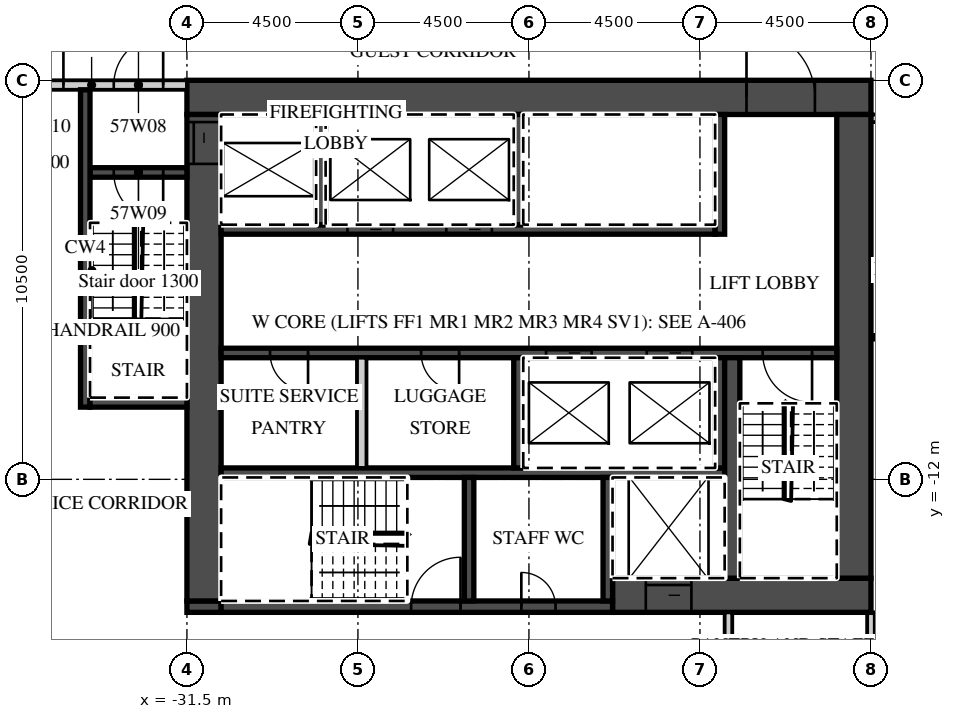
"""IFC4 building model, lengths in metres.
Left out: names, types, materials, properties, quantities, classifications, styles, units other than length and angle.
Written with IfcOpenShell. Run it as: python <this file> out.ifc"""

import sys

from ifc_helpers import new_model, si_unit, direction, frame, frame_2d, origin, place, context, subcontext, project, spatial, rectangle, extrude, element, fill, save


model = new_model("IFC4")
c1 = context("Model", 3, precision=1e-05, world=origin(), true_north=direction((0.0, 1.0)))
c2 = subcontext(c1, "Body", "Model", "MODEL_VIEW")
j1 = project(units=[si_unit("LENGTHUNIT", "METRE"), si_unit("PLANEANGLEUNIT", "RADIAN")], contexts=[c1])
p1 = place(None, origin())
s1 = spatial("IfcSite", under=j1, at=p1, CompositionType="ELEMENT")
p2 = place(p1, origin())
s2 = spatial("IfcBuilding", under=s1, at=p2, CompositionType="ELEMENT")
p3 = place(p2, frame((0.0, 0.0, 234.2)))
s3 = spatial("IfcBuildingStorey", under=s2, at=p3, CompositionType="ELEMENT", Elevation=234.2)
p4 = place(p3, frame((-13.5, -19.641, 0.0), z_axis=(0.0, 0.0, 1.0), x_axis=(0.0, 1.0, 0.0)))
e1 = element("IfcWall", 1, at=p4, inside=s3, PredefinedType="PARTITIONING", context=c2, shape_type="SweptSolid", body=[
    extrude(rectangle(XDim=4.141, YDim=0.2, at=frame_2d((2.071, 0.0))), origin(), (0.0, 0.0, 1.0), 3.02),
])
p5 = place(p3, frame((-13.5, -2.5, 0.0), z_axis=(0.0, 0.0, 1.0), x_axis=(1.0, 0.0, 0.0)))
e2 = element("IfcWall", 2, at=p5, inside=s3, PredefinedType="PARTITIONING", context=c2, shape_type="SweptSolid", body=[
    extrude(rectangle(XDim=27.0, YDim=0.2, at=frame_2d((13.5, 0.0))), origin(), (0.0, 0.0, 1.0), 3.02),
])
p6 = place(p5, frame((2.925, 0.0, 0.0)))
e3 = element("IfcOpeningElement", 3, at=p6, cuts=e2, PredefinedType="OPENING", context=c2, shape_type="SweptSolid", body=[
    extrude(rectangle(XDim=1.0, YDim=2.1, at=frame_2d((0.5, 1.05))), frame((0.0, 0.11, 0.0), z_axis=(0.0, -1.0, 0.0), x_axis=(1.0, 0.0, 0.0)), (0.0, 0.0, 1.0), 0.22),
])
p7 = place(p5, frame((9.863, 0.0, 0.0)))
e4 = element("IfcOpeningElement", 4, at=p7, cuts=e2, PredefinedType="OPENING", context=c2, shape_type="SweptSolid", body=[
    extrude(rectangle(XDim=1.2, YDim=2.1, at=frame_2d((0.6, 1.05))), frame((0.0, 0.11, 0.0), z_axis=(0.0, -1.0, 0.0), x_axis=(1.0, 0.0, 0.0)), (0.0, 0.0, 1.0), 0.22),
])
p8 = place(p5, frame((16.45, 0.0, 0.0)))
e5 = element("IfcOpeningElement", 5, at=p8, cuts=e2, PredefinedType="OPENING", context=c2, shape_type="SweptSolid", body=[
    extrude(rectangle(XDim=1.0, YDim=2.1, at=frame_2d((0.5, 1.05))), frame((0.0, 0.11, 0.0), z_axis=(0.0, -1.0, 0.0), x_axis=(1.0, 0.0, 0.0)), (0.0, 0.0, 1.0), 0.22),
])
p9 = place(p5, frame((20.925, 0.0, 0.0)))
e6 = element("IfcOpeningElement", 6, at=p9, cuts=e2, PredefinedType="OPENING", context=c2, shape_type="SweptSolid", body=[
    extrude(rectangle(XDim=1.0, YDim=2.1, at=frame_2d((0.5, 1.05))), frame((0.0, 0.11, 0.0), z_axis=(0.0, -1.0, 0.0), x_axis=(1.0, 0.0, 0.0)), (0.0, 0.0, 1.0), 0.22),
])
p10 = place(p5, frame((25.425, 0.0, 0.0)))
e7 = element("IfcOpeningElement", 7, at=p10, cuts=e2, PredefinedType="OPENING", context=c2, shape_type="SweptSolid", body=[
    extrude(rectangle(XDim=1.0, YDim=2.1, at=frame_2d((0.5, 1.05))), frame((0.0, 0.11, 0.0), z_axis=(0.0, -1.0, 0.0), x_axis=(1.0, 0.0, 0.0)), (0.0, 0.0, 1.0), 0.22),
])
p11 = place(p3, frame((-31.5, -1.95, 0.0), z_axis=(0.0, 0.0, 1.0), x_axis=(1.0, 0.0, 0.0)))
e8 = element("IfcWall", 8, at=p11, inside=s3, PredefinedType="SHEAR", context=c2, shape_type="SweptSolid", body=[
    extrude(rectangle(XDim=18.0, YDim=0.9, at=frame_2d((9.0, 0.0))), origin(), (0.0, 0.0, 1.0), 3.02),
])
p12 = place(p11, frame((14.725, 0.0, 0.0)))
e9 = element("IfcOpeningElement", 9, at=p12, cuts=e8, PredefinedType="OPENING", context=c2, shape_type="SweptSolid", body=[
    extrude(rectangle(XDim=1.8, YDim=2.1, at=frame_2d((0.9, 1.05))), frame((0.0, 0.46, 0.0), z_axis=(0.0, -1.0, 0.0), x_axis=(1.0, 0.0, 0.0)), (0.0, 0.0, 1.0), 0.92),
])
p13 = place(p3, frame((-20.3, -15.05, 0.0), z_axis=(0.0, 0.0, 1.0), x_axis=(1.0, 0.0, 0.0)))
e10 = element("IfcWall", 10, at=p13, inside=s3, PredefinedType="SHEAR", context=c2, shape_type="SweptSolid", body=[
    extrude(rectangle(XDim=6.8, YDim=0.9, at=frame_2d((3.4, 0.0))), origin(), (0.0, 0.0, 1.0), 3.02),
])
p14 = place(p13, frame((0.875, 0.0, 0.0)))
e11 = element("IfcOpeningElement", 11, at=p14, cuts=e10, PredefinedType="OPENING", context=c2, shape_type="SweptSolid", body=[
    extrude(rectangle(XDim=1.2, YDim=2.1, at=frame_2d((0.6, 1.05))), frame((0.0, 0.46, 0.0), z_axis=(0.0, -1.0, 0.0), x_axis=(1.0, 0.0, 0.0)), (0.0, 0.0, 1.0), 0.92),
])
p15 = place(p3, frame((-31.5, -15.35, 0.0), z_axis=(0.0, 0.0, 1.0), x_axis=(1.0, 0.0, 0.0)))
e12 = element("IfcWall", 12, at=p15, inside=s3, PredefinedType="SHEAR", context=c2, shape_type="SweptSolid", body=[
    extrude(rectangle(XDim=0.9, YDim=0.3, at=frame_2d((0.45, 0.0))), origin(), (0.0, 0.0, 1.0), 3.02),
])
p16 = place(p3, frame((-30.6, -15.35, 0.0), z_axis=(0.0, 0.0, 1.0), x_axis=(1.0, 0.0, 0.0)))
e13 = element("IfcWall", 13, at=p16, inside=s3, PredefinedType="SHEAR", context=c2, shape_type="SweptSolid", body=[
    extrude(rectangle(XDim=10.3, YDim=0.3, at=frame_2d((5.15, 0.0))), origin(), (0.0, 0.0, 1.0), 3.02),
])
p17 = place(p16, frame((5.0, 0.0, 0.0)))
e14 = element("IfcOpeningElement", 14, at=p17, cuts=e13, PredefinedType="OPENING", context=c2, shape_type="SweptSolid", body=[
    extrude(rectangle(XDim=1.3, YDim=2.1, at=frame_2d((0.65, 1.05))), frame((0.0, 0.16, 0.0), z_axis=(0.0, -1.0, 0.0), x_axis=(1.0, 0.0, 0.0)), (0.0, 0.0, 1.0), 0.32),
])
p18 = place(p16, frame((7.9, 0.0, 0.0)))
e15 = element("IfcOpeningElement", 15, at=p18, cuts=e13, PredefinedType="OPENING", context=c2, shape_type="SweptSolid", body=[
    extrude(rectangle(XDim=0.9, YDim=2.1, at=frame_2d((0.45, 1.05))), frame((0.0, 0.16, 0.0), z_axis=(0.0, -1.0, 0.0), x_axis=(1.0, 0.0, 0.0)), (0.0, 0.0, 1.0), 0.32),
])
p19 = place(p3, frame((-31.05, -15.2, 0.0), z_axis=(0.0, 0.0, 1.0), x_axis=(0.0, 1.0, 0.0)))
e16 = element("IfcWall", 16, at=p19, inside=s3, PredefinedType="SHEAR", context=c2, shape_type="SweptSolid", body=[
    extrude(rectangle(XDim=12.8, YDim=0.9, at=frame_2d((6.4, 0.0))), origin(), (0.0, 0.0, 1.0), 3.02),
])
p20 = place(p19, frame((11.5, 0.0, 0.0)))
e17 = element("IfcOpeningElement", 17, at=p20, cuts=e16, PredefinedType="OPENING", context=c2, shape_type="SweptSolid", body=[
    extrude(rectangle(XDim=1.1, YDim=2.1, at=frame_2d((0.55, 1.05))), frame((0.0, 0.46, 0.0), z_axis=(0.0, -1.0, 0.0), x_axis=(1.0, 0.0, 0.0)), (0.0, 0.0, 1.0), 0.92),
])
p21 = place(p3, frame((-13.95, -14.6, 0.0), z_axis=(0.0, 0.0, 1.0), x_axis=(0.0, 1.0, 0.0)))
e18 = element("IfcWall", 18, at=p21, inside=s3, PredefinedType="SHEAR", context=c2, shape_type="SweptSolid", body=[
    extrude(rectangle(XDim=12.2, YDim=0.9, at=frame_2d((6.1, 0.0))), origin(), (0.0, 0.0, 1.0), 3.02),
])
p22 = place(p3, frame((-30.6, -5.425, 0.0), z_axis=(0.0, 0.0, 1.0), x_axis=(1.0, 0.0, 0.0)))
e19 = element("IfcWall", 19, at=p22, inside=s3, PredefinedType="SHEAR", context=c2, shape_type="SweptSolid", body=[
    extrude(rectangle(XDim=13.0, YDim=0.25, at=frame_2d((6.5, 0.0))), origin(), (0.0, 0.0, 1.0), 3.02),
])
p23 = place(p22, frame((3.325, 0.0, 0.0)))
e20 = element("IfcOpeningElement", 20, at=p23, cuts=e19, PredefinedType="OPENING", context=c2, shape_type="SweptSolid", body=[
    extrude(rectangle(XDim=1.2, YDim=2.1, at=frame_2d((0.6, 1.05))), frame((0.0, 0.135, 0.0), z_axis=(0.0, -1.0, 0.0), x_axis=(1.0, 0.0, 0.0)), (0.0, 0.0, 1.0), 0.27),
])
p24 = place(p22, frame((5.925, 0.0, 0.0)))
e21 = element("IfcOpeningElement", 21, at=p24, cuts=e19, PredefinedType="OPENING", context=c2, shape_type="SweptSolid", body=[
    extrude(rectangle(XDim=1.2, YDim=2.1, at=frame_2d((0.6, 1.05))), frame((0.0, 0.135, 0.0), z_axis=(0.0, -1.0, 0.0), x_axis=(1.0, 0.0, 0.0)), (0.0, 0.0, 1.0), 0.27),
])
p25 = place(p3, frame((-17.475, -5.55, 0.0), z_axis=(0.0, 0.0, 1.0), x_axis=(0.0, 1.0, 0.0)))
e22 = element("IfcWall", 22, at=p25, inside=s3, PredefinedType="SHEAR", context=c2, shape_type="SweptSolid", body=[
    extrude(rectangle(XDim=3.15, YDim=0.25, at=frame_2d((1.575, 0.0))), origin(), (0.0, 0.0, 1.0), 3.02),
])
for number, where, z_axis, x_axis in (
    (23, (-27.975, -5.3, 0.0), (0.0, 0.0, 1.0), (0.0, 1.0, 0.0)),
    (24, (-22.775, -5.3, 0.0), (0.0, 0.0, 1.0), (0.0, 1.0, 0.0)),
):
    element("IfcWall", number, at=place(p3, frame(where, z_axis=z_axis, x_axis=x_axis)), inside=s3, PredefinedType="SHEAR", context=c2, shape_type="SweptSolid", body=[
        extrude(rectangle(XDim=2.9, YDim=0.25, at=frame_2d((1.45, 0.0))), origin(), (0.0, 0.0, 1.0), 3.02),
    ])
p26 = place(p3, frame((-30.6, -8.675, 0.0), z_axis=(0.0, 0.0, 1.0), x_axis=(1.0, 0.0, 0.0)))
e25 = element("IfcWall", 25, at=p26, inside=s3, PredefinedType="SHEAR", context=c2, shape_type="SweptSolid", body=[
    extrude(rectangle(XDim=16.2, YDim=0.25, at=frame_2d((8.1, 0.0))), origin(), (0.0, 0.0, 1.0), 3.02),
])
p27 = place(p26, frame((8.55, 0.0, 0.0)))
e26 = element("IfcOpeningElement", 26, at=p27, cuts=e25, PredefinedType="OPENING", context=c2, shape_type="SweptSolid", body=[
    extrude(rectangle(XDim=1.2, YDim=2.1, at=frame_2d((0.6, 1.05))), frame((0.0, 0.135, 0.0), z_axis=(0.0, -1.0, 0.0), x_axis=(1.0, 0.0, 0.0)), (0.0, 0.0, 1.0), 0.27),
])
p28 = place(p26, frame((11.2, 0.0, 0.0)))
e27 = element("IfcOpeningElement", 27, at=p28, cuts=e25, PredefinedType="OPENING", context=c2, shape_type="SweptSolid", body=[
    extrude(rectangle(XDim=1.2, YDim=2.1, at=frame_2d((0.6, 1.05))), frame((0.0, 0.135, 0.0), z_axis=(0.0, -1.0, 0.0), x_axis=(1.0, 0.0, 0.0)), (0.0, 0.0, 1.0), 0.27),
])
p29 = place(p26, frame((14.25, 0.0, 0.0)))
e28 = element("IfcOpeningElement", 28, at=p29, cuts=e25, PredefinedType="OPENING", context=c2, shape_type="SweptSolid", body=[
    extrude(rectangle(XDim=1.3, YDim=2.1, at=frame_2d((0.65, 1.05))), frame((0.0, 0.135, 0.0), z_axis=(0.0, -1.0, 0.0), x_axis=(1.0, 0.0, 0.0)), (0.0, 0.0, 1.0), 0.27),
])
p30 = place(p26, frame((1.288, 0.0, 0.0)))
e29 = element("IfcOpeningElement", 29, at=p30, cuts=e25, PredefinedType="OPENING", context=c2, shape_type="SweptSolid", body=[
    extrude(rectangle(XDim=1.0, YDim=2.1, at=frame_2d((0.5, 1.05))), frame((0.0, 0.135, 0.0), z_axis=(0.0, -1.0, 0.0), x_axis=(1.0, 0.0, 0.0)), (0.0, 0.0, 1.0), 0.27),
])
p31 = place(p26, frame((5.262, 0.0, 0.0)))
e30 = element("IfcOpeningElement", 30, at=p31, cuts=e25, PredefinedType="OPENING", context=c2, shape_type="SweptSolid", body=[
    extrude(rectangle(XDim=1.0, YDim=2.1, at=frame_2d((0.5, 1.05))), frame((0.0, 0.135, 0.0), z_axis=(0.0, -1.0, 0.0), x_axis=(1.0, 0.0, 0.0)), (0.0, 0.0, 1.0), 0.27),
])
p32 = place(p3, frame((-30.6, -11.825, 0.0), z_axis=(0.0, 0.0, 1.0), x_axis=(1.0, 0.0, 0.0)))
e31 = element("IfcWall", 31, at=p32, inside=s3, PredefinedType="SHEAR", context=c2, shape_type="SweptSolid", body=[
    extrude(rectangle(XDim=13.25, YDim=0.25, at=frame_2d((6.625, 0.0))), origin(), (0.0, 0.0, 1.0), 3.02),
])
for number, where, z_axis, x_axis in (
    (32, (-17.475, -11.7, 0.0), (0.0, 0.0, 1.0), (0.0, 1.0, 0.0)),
    (33, (-22.775, -11.7, 0.0), (0.0, 0.0, 1.0), (0.0, 1.0, 0.0)),
):
    element("IfcWall", number, at=place(p3, frame(where, z_axis=z_axis, x_axis=x_axis)), inside=s3, PredefinedType="SHEAR", context=c2, shape_type="SweptSolid", body=[
        extrude(rectangle(XDim=2.9, YDim=0.25, at=frame_2d((1.45, 0.0))), origin(), (0.0, 0.0, 1.0), 3.02),
    ])
p33 = place(p3, frame((-26.9, -11.7, 0.0), z_axis=(0.0, 0.0, 1.0), x_axis=(0.0, 1.0, 0.0)))
e34 = element("IfcWall", 34, at=p33, inside=s3, PredefinedType="PARTITIONING", context=c2, shape_type="SweptSolid", body=[
    extrude(rectangle(XDim=2.9, YDim=0.25, at=frame_2d((1.45, 0.0))), origin(), (0.0, 0.0, 1.0), 3.02),
])
p34 = place(p3, frame((-17.15, -14.6, 0.0), z_axis=(0.0, 0.0, 1.0), x_axis=(0.0, 1.0, 0.0)))
e35 = element("IfcWall", 35, at=p34, inside=s3, PredefinedType="SHEAR", context=c2, shape_type="SweptSolid", body=[
    extrude(rectangle(XDim=5.8, YDim=0.4, at=frame_2d((2.9, 0.0))), origin(), (0.0, 0.0, 1.0), 3.02),
])
for number, where, z_axis, x_axis in (
    (36, (-20.425, -15.2, 0.0), (0.0, 0.0, 1.0), (0.0, 1.0, 0.0)),
    (37, (-24.075, -15.2, 0.0), (0.0, 0.0, 1.0), (0.0, 1.0, 0.0)),
):
    element("IfcWall", number, at=place(p3, frame(where, z_axis=z_axis, x_axis=x_axis)), inside=s3, PredefinedType="SHEAR", context=c2, shape_type="SweptSolid", body=[
        extrude(rectangle(XDim=3.25, YDim=0.25, at=frame_2d((1.625, 0.0))), origin(), (0.0, 0.0, 1.0), 3.02),
    ])
p35 = place(p3, frame((-36.515, -1.625, 0.0), z_axis=(0.0, 0.0, 1.0), x_axis=(1.0, 0.0, 0.0)))
e38 = element("IfcWall", 38, at=p35, inside=s3, PredefinedType="PARTITIONING", context=c2, shape_type="SweptSolid", body=[
    extrude(rectangle(XDim=5.015, YDim=0.25, at=frame_2d((2.508, 0.0))), origin(), (0.0, 0.0, 1.0), 3.02),
])
p36 = place(p35, frame((3.09, 0.0, 0.0)))
e39 = element("IfcOpeningElement", 39, at=p36, cuts=e38, PredefinedType="OPENING", context=c2, shape_type="SweptSolid", body=[
    extrude(rectangle(XDim=1.3, YDim=2.1, at=frame_2d((0.65, 1.05))), frame((0.0, 0.135, 0.0), z_axis=(0.0, -1.0, 0.0), x_axis=(1.0, 0.0, 0.0)), (0.0, 0.0, 1.0), 0.27),
])
p37 = place(p35, frame((0.665, 0.0, 0.0)))
e40 = element("IfcOpeningElement", 40, at=p37, cuts=e38, PredefinedType="OPENING", context=c2, shape_type="SweptSolid", body=[
    extrude(rectangle(XDim=1.1, YDim=2.1, at=frame_2d((0.55, 1.05))), frame((0.0, 0.135, 0.0), z_axis=(0.0, -1.0, 0.0), x_axis=(1.0, 0.0, 0.0)), (0.0, 0.0, 1.0), 0.27),
])
p38 = place(p3, frame((-34.05, -3.925, 0.0), z_axis=(0.0, 0.0, 1.0), x_axis=(1.0, 0.0, 0.0)))
e41 = element("IfcWall", 41, at=p38, inside=s3, PredefinedType="SHEAR", context=c2, shape_type="SweptSolid", body=[
    extrude(rectangle(XDim=2.55, YDim=0.25, at=frame_2d((1.275, 0.0))), origin(), (0.0, 0.0, 1.0), 3.02),
])
p39 = place(p38, frame((0.625, 0.0, 0.0)))
e42 = element("IfcOpeningElement", 42, at=p39, cuts=e41, PredefinedType="OPENING", context=c2, shape_type="SweptSolid", body=[
    extrude(rectangle(XDim=1.3, YDim=2.1, at=frame_2d((0.65, 1.05))), frame((0.0, 0.135, 0.0), z_axis=(0.0, -1.0, 0.0), x_axis=(1.0, 0.0, 0.0)), (0.0, 0.0, 1.0), 0.27),
])
p40 = place(p3, frame((-34.175, -10.1, 0.0), z_axis=(0.0, 0.0, 1.0), x_axis=(0.0, 1.0, 0.0)))
e43 = element("IfcWall", 43, at=p40, inside=s3, PredefinedType="SHEAR", context=c2, shape_type="SweptSolid", body=[
    extrude(rectangle(XDim=8.35, YDim=0.25, at=frame_2d((4.175, 0.0))), origin(), (0.0, 0.0, 1.0), 3.02),
])
p41 = place(p3, frame((-34.05, -9.975, 0.0), z_axis=(0.0, 0.0, 1.0), x_axis=(1.0, 0.0, 0.0)))
e44 = element("IfcWall", 44, at=p41, inside=s3, PredefinedType="SHEAR", context=c2, shape_type="SweptSolid", body=[
    extrude(rectangle(XDim=2.55, YDim=0.25, at=frame_2d((1.275, 0.0))), origin(), (0.0, 0.0, 1.0), 3.02),
])
p42 = place(p3, frame((-17.25, -17.7, 0.0), z_axis=(0.0, 0.0, 1.0), x_axis=(0.0, 1.0, 0.0)))
e45 = element("IfcWall", 45, at=p42, inside=s3, PredefinedType="PARTITIONING", context=c2, shape_type="SweptSolid", body=[
    extrude(rectangle(XDim=2.2, YDim=0.2, at=frame_2d((1.1, 0.0))), origin(), (0.0, 0.0, 1.0), 3.02),
])
p43 = place(p27, origin())
e46 = element("IfcDoor", 46, at=p43, inside=s3, OperationType="SLIDING_TO_LEFT", PredefinedType="DOOR", context=c2, shape_type="SweptSolid", body=[
    extrude(rectangle(XDim=1.2, YDim=2.1, at=frame_2d((0.6, 1.05))), frame((0.0, 0.025, 0.0), z_axis=(0.0, -1.0, 0.0), x_axis=(1.0, 0.0, 0.0)), (0.0, 0.0, 1.0), 0.05),
])
fill(e26, e46)
p44 = place(p28, origin())
e47 = element("IfcDoor", 47, at=p44, inside=s3, OperationType="SLIDING_TO_RIGHT", PredefinedType="DOOR", context=c2, shape_type="SweptSolid", body=[
    extrude(rectangle(XDim=1.2, YDim=2.1, at=frame_2d((0.6, 1.05))), frame((0.0, 0.025, 0.0), z_axis=(0.0, -1.0, 0.0), x_axis=(1.0, 0.0, 0.0)), (0.0, 0.0, 1.0), 0.05),
])
fill(e27, e47)
p45 = place(p23, origin())
e48 = element("IfcDoor", 48, at=p45, inside=s3, OperationType="SLIDING_TO_RIGHT", PredefinedType="DOOR", context=c2, shape_type="SweptSolid", body=[
    extrude(rectangle(XDim=1.2, YDim=2.1, at=frame_2d((0.6, 1.05))), frame((0.0, 0.025, 0.0), z_axis=(0.0, -1.0, 0.0), x_axis=(1.0, 0.0, 0.0)), (0.0, 0.0, 1.0), 0.05),
])
fill(e20, e48)
p46 = place(p24, origin())
e49 = element("IfcDoor", 49, at=p46, inside=s3, OperationType="SLIDING_TO_RIGHT", PredefinedType="DOOR", context=c2, shape_type="SweptSolid", body=[
    extrude(rectangle(XDim=1.2, YDim=2.1, at=frame_2d((0.6, 1.05))), frame((0.0, 0.025, 0.0), z_axis=(0.0, -1.0, 0.0), x_axis=(1.0, 0.0, 0.0)), (0.0, 0.0, 1.0), 0.05),
])
fill(e21, e49)
p47 = place(p14, origin())
e50 = element("IfcDoor", 50, at=p47, inside=s3, OperationType="SLIDING_TO_LEFT", PredefinedType="DOOR", context=c2, shape_type="SweptSolid", body=[
    extrude(rectangle(XDim=1.2, YDim=2.1, at=frame_2d((0.6, 1.05))), frame((0.0, 0.025, 0.0), z_axis=(0.0, -1.0, 0.0), x_axis=(1.0, 0.0, 0.0)), (0.0, 0.0, 1.0), 0.05),
])
fill(e11, e50)
p48 = place(p20, origin())
e51 = element("IfcDoor", 51, at=p48, inside=s3, OperationType="SLIDING_TO_RIGHT", PredefinedType="DOOR", context=c2, shape_type="SweptSolid", body=[
    extrude(rectangle(XDim=1.1, YDim=2.1, at=frame_2d((0.55, 1.05))), frame((0.0, 0.025, 0.0), z_axis=(0.0, -1.0, 0.0), x_axis=(1.0, 0.0, 0.0)), (0.0, 0.0, 1.0), 0.05),
])
fill(e17, e51)
p49 = place(p12, origin())
e52 = element("IfcDoor", 52, at=p49, inside=s3, OperationType="DOUBLE_DOOR_DOUBLE_SWING", PredefinedType="DOOR", context=c2, shape_type="SweptSolid", body=[
    extrude(rectangle(XDim=1.8, YDim=2.1, at=frame_2d((0.9, 1.05))), frame((0.0, 0.025, 0.0), z_axis=(0.0, -1.0, 0.0), x_axis=(1.0, 0.0, 0.0)), (0.0, 0.0, 1.0), 0.05),
])
fill(e9, e52)
p50 = place(p36, origin())
e53 = element("IfcDoor", 53, at=p50, inside=s3, OperationType="SINGLE_SWING_RIGHT", PredefinedType="DOOR", context=c2, shape_type="SweptSolid", body=[
    extrude(rectangle(XDim=1.3, YDim=2.1, at=frame_2d((0.65, 1.05))), frame((0.0, 0.025, 0.0), z_axis=(0.0, -1.0, 0.0), x_axis=(1.0, 0.0, 0.0)), (0.0, 0.0, 1.0), 0.05),
])
fill(e39, e53)
p51 = place(p39, origin())
e54 = element("IfcDoor", 54, at=p51, inside=s3, OperationType="SINGLE_SWING_RIGHT", PredefinedType="DOOR", context=c2, shape_type="SweptSolid", body=[
    extrude(rectangle(XDim=1.3, YDim=2.1, at=frame_2d((0.65, 1.05))), frame((0.0, 0.025, 0.0), z_axis=(0.0, -1.0, 0.0), x_axis=(1.0, 0.0, 0.0)), (0.0, 0.0, 1.0), 0.05),
])
fill(e42, e54)
p52 = place(p37, origin())
e55 = element("IfcDoor", 55, at=p52, inside=s3, OperationType="SINGLE_SWING_RIGHT", PredefinedType="DOOR", context=c2, shape_type="SweptSolid", body=[
    extrude(rectangle(XDim=1.1, YDim=2.1, at=frame_2d((0.55, 1.05))), frame((0.0, 0.025, 0.0), z_axis=(0.0, -1.0, 0.0), x_axis=(1.0, 0.0, 0.0)), (0.0, 0.0, 1.0), 0.05),
])
fill(e40, e55)
p53 = place(p29, origin())
e56 = element("IfcDoor", 56, at=p53, inside=s3, OperationType="SINGLE_SWING_RIGHT", PredefinedType="DOOR", context=c2, shape_type="SweptSolid", body=[
    extrude(rectangle(XDim=1.3, YDim=2.1, at=frame_2d((0.65, 1.05))), frame((0.0, 0.025, 0.0), z_axis=(0.0, -1.0, 0.0), x_axis=(1.0, 0.0, 0.0)), (0.0, 0.0, 1.0), 0.05),
])
fill(e28, e56)
p54 = place(p17, origin())
e57 = element("IfcDoor", 57, at=p54, inside=s3, OperationType="SINGLE_SWING_RIGHT", PredefinedType="DOOR", context=c2, shape_type="SweptSolid", body=[
    extrude(rectangle(XDim=1.3, YDim=2.1, at=frame_2d((0.65, 1.05))), frame((0.0, 0.025, 0.0), z_axis=(0.0, -1.0, 0.0), x_axis=(1.0, 0.0, 0.0)), (0.0, 0.0, 1.0), 0.05),
])
fill(e14, e57)
p55 = place(p18, origin())
e58 = element("IfcDoor", 58, at=p55, inside=s3, OperationType="SINGLE_SWING_LEFT", PredefinedType="DOOR", context=c2, shape_type="SweptSolid", body=[
    extrude(rectangle(XDim=0.9, YDim=2.1, at=frame_2d((0.45, 1.05))), frame((0.0, 0.025, 0.0), z_axis=(0.0, -1.0, 0.0), x_axis=(1.0, 0.0, 0.0)), (0.0, 0.0, 1.0), 0.05),
])
fill(e15, e58)
p56 = place(p30, origin())
e59 = element("IfcDoor", 59, at=p56, inside=s3, OperationType="SINGLE_SWING_RIGHT", PredefinedType="DOOR", context=c2, shape_type="SweptSolid", body=[
    extrude(rectangle(XDim=1.0, YDim=2.1, at=frame_2d((0.5, 1.05))), frame((0.0, 0.025, 0.0), z_axis=(0.0, -1.0, 0.0), x_axis=(1.0, 0.0, 0.0)), (0.0, 0.0, 1.0), 0.05),
])
fill(e29, e59)
p57 = place(p31, origin())
e60 = element("IfcDoor", 60, at=p57, inside=s3, OperationType="SINGLE_SWING_RIGHT", PredefinedType="DOOR", context=c2, shape_type="SweptSolid", body=[
    extrude(rectangle(XDim=1.0, YDim=2.1, at=frame_2d((0.5, 1.05))), frame((0.0, 0.025, 0.0), z_axis=(0.0, -1.0, 0.0), x_axis=(1.0, 0.0, 0.0)), (0.0, 0.0, 1.0), 0.05),
])
fill(e30, e60)
save(model, sys.argv[1])
